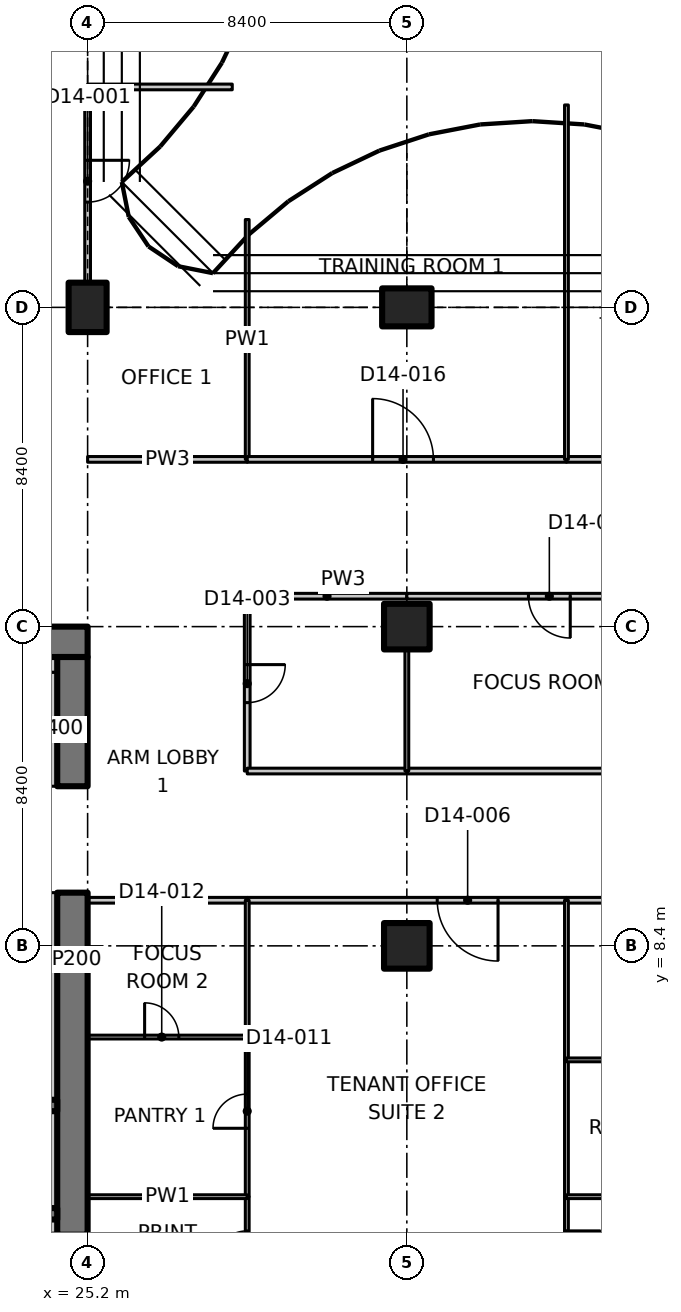
"""IFC4 building model, lengths in metres.
Left out: names, types, materials, properties, quantities, classifications, styles, units other than length and angle.
Written with IfcOpenShell. Run it as: python <this file> out.ifc"""

import sys

from ifc_helpers import new_model, si_unit, direction, frame, frame_2d, origin, origin_2d, place, context, subcontext, project, spatial, polyline, rectangle, outline, extrude, element, fill, save


model = new_model("IFC4")
c1 = context("Model", 3, precision=1e-05, world=origin(), true_north=direction((0.0, 1.0)))
c2 = subcontext(c1, "Body", "Model", "MODEL_VIEW")
j1 = project(units=[si_unit("LENGTHUNIT", "METRE"), si_unit("PLANEANGLEUNIT", "RADIAN")], contexts=[c1])
p1 = place(None, origin())
s1 = spatial("IfcSite", under=j1, at=p1, CompositionType="ELEMENT")
p2 = place(p1, origin())
s2 = spatial("IfcBuilding", under=s1, at=p2, CompositionType="ELEMENT")
p3 = place(p2, frame((0.0, 0.0, 106.1)))
s3 = spatial("IfcBuildingStorey", under=s2, at=p3, CompositionType="ELEMENT", Elevation=106.1)
p4 = place(p3, frame((25.2, 25.2, 0.0), z_axis=(0.0, 0.0, 1.0), x_axis=(1.0, 0.0, 0.0)))
e1 = element("IfcColumn", 1, at=p4, inside=s3, PredefinedType="COLUMN", context=c2, shape_type="SweptSolid", body=[
    extrude(rectangle(XDim=1.0, YDim=1.3, at=origin_2d()), origin(), (0.0, 0.0, 1.0), 3.35),
])
for number, where, z_axis, x_axis in (
    (2, (33.6, 8.4, 0.0), (0.0, 0.0, 1.0), (1.0, 0.0, 0.0)),
    (3, (33.6, 16.8, 0.0), (0.0, 0.0, 1.0), (1.0, 0.0, 0.0)),
):
    element("IfcColumn", number, at=place(p3, frame(where, z_axis=z_axis, x_axis=x_axis)), inside=s3, PredefinedType="COLUMN", context=c2, shape_type="SweptSolid", body=[
        extrude(rectangle(XDim=1.2, YDim=1.2, at=origin_2d()), origin(), (0.0, 0.0, 1.0), 3.35),
    ])
p5 = place(p3, frame((33.6, 25.2, 0.0), z_axis=(0.0, 0.0, 1.0), x_axis=(0.0, 1.0, 0.0)))
e4 = element("IfcColumn", 4, at=p5, inside=s3, PredefinedType="COLUMN", context=c2, shape_type="SweptSolid", body=[
    extrude(rectangle(XDim=1.0, YDim=1.3, at=origin_2d()), origin(), (0.0, 0.0, 1.0), 3.35),
])
p6 = place(p3, frame((23.8, 16.4, 0.0), z_axis=(0.0, 0.0, 1.0), x_axis=(1.0, 0.0, 0.0)))
e5 = element("IfcWall", 5, at=p6, inside=s3, PredefinedType="SHEAR", context=c2, shape_type="SweptSolid", body=[
    extrude(rectangle(XDim=1.4, YDim=0.8, at=frame_2d((0.7, 0.0))), origin(), (0.0, 0.0, 1.0), 3.35),
])
p7 = place(p3, frame((24.8, 0.8, 0.0), z_axis=(0.0, 0.0, 1.0), x_axis=(0.0, 1.0, 0.0)))
e6 = element("IfcWall", 6, at=p7, inside=s3, PredefinedType="SHEAR", context=c2, shape_type="SweptSolid", body=[
    extrude(rectangle(XDim=9.0, YDim=0.8, at=frame_2d((4.5, 0.0))), origin(), (0.0, 0.0, 1.0), 3.35),
])
p8 = place(p3, frame((24.8, 12.6, 0.0), z_axis=(0.0, 0.0, 1.0), x_axis=(0.0, 1.0, 0.0)))
e7 = element("IfcWall", 7, at=p8, inside=s3, PredefinedType="SHEAR", context=c2, shape_type="SweptSolid", body=[
    extrude(rectangle(XDim=3.4, YDim=0.8, at=frame_2d((1.7, 0.0))), origin(), (0.0, 0.0, 1.0), 3.35),
])
p9 = place(p3, frame((24.2, 12.6, 0.0), z_axis=(0.0, 0.0, 1.0), x_axis=(0.0, 1.0, 0.0)))
e8 = element("IfcWall", 8, at=p9, inside=s3, PredefinedType="PARTITIONING", context=c2, shape_type="SweptSolid", body=[
    extrude(rectangle(XDim=3.0, YDim=0.4, at=frame_2d((1.5, 0.0))), origin(), (0.0, 0.0, 1.0), 3.35),
])
p10 = place(p3, frame((23.8, 15.8, 0.0), z_axis=(0.0, 0.0, 1.0), x_axis=(1.0, 0.0, 0.0)))
e9 = element("IfcWall", 9, at=p10, inside=s3, PredefinedType="PARTITIONING", context=c2, shape_type="SweptSolid", body=[
    extrude(rectangle(XDim=0.6, YDim=0.4, at=frame_2d((0.3, 0.0))), origin(), (0.0, 0.0, 1.0), 3.35),
])
p11 = place(p3, frame((15.8, 1.35, 0.0), z_axis=(0.0, 0.0, 1.0), x_axis=(1.0, 0.0, 0.0)))
e10 = element("IfcWall", 10, at=p11, inside=s3, PredefinedType="SHEAR", context=c2, shape_type="SweptSolid", body=[
    extrude(rectangle(XDim=8.6, YDim=0.3, at=frame_2d((4.3, 0.0))), origin(), (0.0, 0.0, 1.0), 3.35),
])
p12 = place(p3, frame((15.8, 4.2, 0.0), z_axis=(0.0, 0.0, 1.0), x_axis=(1.0, 0.0, 0.0)))
e11 = element("IfcWall", 11, at=p12, inside=s3, PredefinedType="SHEAR", context=c2, shape_type="SweptSolid", body=[
    extrude(rectangle(XDim=8.6, YDim=0.3, at=frame_2d((4.3, 0.0))), origin(), (0.0, 0.0, 1.0), 3.35),
])
p13 = place(p12, frame((0.4, 0.0, 0.0)))
e12 = element("IfcOpeningElement", 12, at=p13, cuts=e11, PredefinedType="OPENING", context=c2, shape_type="SweptSolid", body=[
    extrude(rectangle(XDim=1.0, YDim=2.1, at=frame_2d((0.5, 1.05))), frame((0.0, 0.16, 0.0), z_axis=(0.0, -1.0, 0.0), x_axis=(1.0, 0.0, 0.0)), (0.0, 0.0, 1.0), 0.32),
])
p14 = place(p3, frame((13.35, 1.0, 0.0), z_axis=(0.0, 0.0, 1.0), x_axis=(1.0, 0.0, 0.0)))
e13 = element("IfcWall", 13, at=p14, inside=s3, PredefinedType="PARTITIONING", context=c2, shape_type="SweptSolid", body=[
    extrude(rectangle(XDim=11.05, YDim=0.4, at=frame_2d((5.525, 0.0))), origin(), (0.0, 0.0, 1.0), 3.35),
])
p15 = place(p3, frame((24.2, 1.5, 0.0), z_axis=(0.0, 0.0, 1.0), x_axis=(0.0, 1.0, 0.0)))
e14 = element("IfcWall", 14, at=p15, inside=s3, PredefinedType="PARTITIONING", context=c2, shape_type="SweptSolid", body=[
    extrude(rectangle(XDim=2.55, YDim=0.4, at=frame_2d((1.275, 0.0))), origin(), (0.0, 0.0, 1.0), 3.35),
])
p16 = place(p3, frame((24.2, 4.35, 0.0), z_axis=(0.0, 0.0, 1.0), x_axis=(0.0, 1.0, 0.0)))
e15 = element("IfcWall", 15, at=p16, inside=s3, PredefinedType="PARTITIONING", context=c2, shape_type="SweptSolid", body=[
    extrude(rectangle(XDim=5.45, YDim=0.4, at=frame_2d((2.725, 0.0))), origin(), (0.0, 0.0, 1.0), 3.35),
])
p17 = place(p3, frame((25.2, 21.2, 0.0), z_axis=(0.0, 0.0, 1.0), x_axis=(1.0, 0.0, 0.0)))
e16 = element("IfcWall", 16, at=p17, inside=s3, PredefinedType="PARTITIONING", context=c2, shape_type="SweptSolid", body=[
    extrude(rectangle(XDim=4.2, YDim=0.15, at=frame_2d((2.1, 0.0))), origin(), (0.0, 0.0, 1.0), 3.33),
])
p18 = place(p3, frame((29.4, 17.6, 0.0), z_axis=(0.0, 0.0, 1.0), x_axis=(0.0, -1.0, 0.0)))
e17 = element("IfcWall", 17, at=p18, inside=s3, PredefinedType="PARTITIONING", context=c2, shape_type="SweptSolid", body=[
    extrude(rectangle(XDim=4.6, YDim=0.15, at=frame_2d((2.3, 0.0))), origin(), (0.0, 0.0, 1.0), 3.33),
])
p19 = place(p18, frame((1.8, 0.0, 0.0)))
e18 = element("IfcOpeningElement", 18, at=p19, cuts=e17, PredefinedType="OPENING", context=c2, shape_type="SweptSolid", body=[
    extrude(rectangle(XDim=1.0, YDim=2.1, at=frame_2d((0.5, 1.05))), frame((0.0, 0.085, 0.0), z_axis=(0.0, -1.0, 0.0), x_axis=(1.0, 0.0, 0.0)), (0.0, 0.0, 1.0), 0.17),
])
p20 = place(p3, frame((29.4, 9.6, 0.0), z_axis=(0.0, 0.0, 1.0), x_axis=(-1.0, 0.0, 0.0)))
e19 = element("IfcWall", 19, at=p20, inside=s3, PredefinedType="PARTITIONING", context=c2, shape_type="SweptSolid", body=[
    extrude(rectangle(XDim=4.2, YDim=0.15, at=frame_2d((2.1, 0.0))), origin(), (0.0, 0.0, 1.0), 3.33),
])
p21 = place(p3, frame((29.4, 27.511, 0.0), z_axis=(0.0, 0.0, 1.0), x_axis=(0.0, -1.0, 0.0)))
e20 = element("IfcWall", 20, at=p21, inside=s3, PredefinedType="PARTITIONING", context=c2, shape_type="SweptSolid", body=[
    extrude(outline(polyline([(0.0, 0.0), (6.311, 0.0), (6.311, 3.33), (2.761, 3.33), (2.759, 2.98), (1.863, 2.98), (1.861, 3.33), (0.236, 3.33), (0.0, 3.33), (0.0, 0.0)])), frame((0.0, 0.05, 0.0), z_axis=(0.0, -1.0, 0.0), x_axis=(1.0, 0.0, 0.0)), (0.0, 0.0, 1.0), 0.1),
])
p22 = place(p3, frame((25.2, 31.0, 0.0), z_axis=(0.0, 0.0, 1.0), x_axis=(0.0, -1.0, 0.0)))
e21 = element("IfcWall", 21, at=p22, inside=s3, PredefinedType="PARTITIONING", context=c2, shape_type="SweptSolid", body=[
    extrude(outline(polyline([(0.0, 0.0), (5.13, 0.0), (5.13, 2.98), (0.0, 2.98), (0.0, 0.0)])), frame((0.0, 0.075, 0.0), z_axis=(0.0, -1.0, 0.0), x_axis=(1.0, 0.0, 0.0)), (0.0, 0.0, 1.0), 0.15),
])
p23 = place(p22, frame((1.93, 0.0, 0.0)))
e22 = element("IfcOpeningElement", 22, at=p23, cuts=e21, PredefinedType="OPENING", context=c2, shape_type="SweptSolid", body=[
    extrude(rectangle(XDim=1.1, YDim=2.1, at=frame_2d((0.55, 1.05))), frame((0.0, 0.085, 0.0), z_axis=(0.0, -1.0, 0.0), x_axis=(1.0, 0.0, 0.0)), (0.0, 0.0, 1.0), 0.17),
])
p24 = place(p3, frame((25.2, 31.0, 0.0), z_axis=(0.0, 0.0, 1.0), x_axis=(1.0, 0.0, 0.0)))
e23 = element("IfcWall", 23, at=p24, inside=s3, PredefinedType="PARTITIONING", context=c2, shape_type="SweptSolid", body=[
    extrude(rectangle(XDim=3.806, YDim=0.15, at=frame_2d((1.903, 0.0))), origin(), (0.0, 0.0, 1.0), 2.98),
])
p25 = place(p3, frame((29.4, 13.0, 0.0), z_axis=(0.0, 0.0, 1.0), x_axis=(1.0, 0.0, 0.0)))
e24 = element("IfcWall", 24, at=p25, inside=s3, PredefinedType="PARTITIONING", context=c2, shape_type="SweptSolid", body=[
    extrude(rectangle(XDim=4.2, YDim=0.15, at=frame_2d((2.1, 0.0))), origin(), (0.0, 0.0, 1.0), 3.33),
])
p26 = place(p3, frame((33.6, 13.0, 0.0), z_axis=(0.0, 0.0, 1.0), x_axis=(1.0, 0.0, 0.0)))
e25 = element("IfcWall", 25, at=p26, inside=s3, PredefinedType="PARTITIONING", context=c2, shape_type="SweptSolid", body=[
    extrude(rectangle(XDim=7.6, YDim=0.15, at=frame_2d((3.8, 0.0))), origin(), (0.0, 0.0, 1.0), 3.33),
])
p27 = place(p3, frame((37.8, 9.6, 0.0), z_axis=(0.0, 0.0, 1.0), x_axis=(-1.0, 0.0, 0.0)))
e26 = element("IfcWall", 26, at=p27, inside=s3, PredefinedType="PARTITIONING", context=c2, shape_type="SweptSolid", body=[
    extrude(rectangle(XDim=8.4, YDim=0.15, at=frame_2d((4.2, 0.0))), origin(), (0.0, 0.0, 1.0), 3.33),
])
p28 = place(p27, frame((1.8, 0.0, 0.0)))
e27 = element("IfcOpeningElement", 27, at=p28, cuts=e26, PredefinedType="OPENING", context=c2, shape_type="SweptSolid", body=[
    extrude(rectangle(XDim=1.6, YDim=2.1, at=frame_2d((0.8, 1.05))), frame((0.0, 0.085, 0.0), z_axis=(0.0, -1.0, 0.0), x_axis=(1.0, 0.0, 0.0)), (0.0, 0.0, 1.0), 0.17),
])
p29 = place(p3, frame((42.0, 9.6, 0.0), z_axis=(0.0, 0.0, 1.0), x_axis=(-1.0, 0.0, 0.0)))
e28 = element("IfcWall", 28, at=p29, inside=s3, PredefinedType="PARTITIONING", context=c2, shape_type="SweptSolid", body=[
    extrude(rectangle(XDim=4.2, YDim=0.15, at=frame_2d((2.1, 0.0))), origin(), (0.0, 0.0, 1.0), 3.33),
])
p30 = place(p3, frame((33.6, 17.6, 0.0), z_axis=(0.0, 0.0, 1.0), x_axis=(-1.0, 0.0, 0.0)))
e29 = element("IfcWall", 29, at=p30, inside=s3, PredefinedType="PARTITIONING", context=c2, shape_type="SweptSolid", body=[
    extrude(rectangle(XDim=4.2, YDim=0.15, at=frame_2d((2.1, 0.0))), origin(), (0.0, 0.0, 1.0), 3.33),
])
p31 = place(p3, frame((41.2, 17.6, 0.0), z_axis=(0.0, 0.0, 1.0), x_axis=(-1.0, 0.0, 0.0)))
e30 = element("IfcWall", 30, at=p31, inside=s3, PredefinedType="PARTITIONING", context=c2, shape_type="SweptSolid", body=[
    extrude(rectangle(XDim=7.6, YDim=0.15, at=frame_2d((3.8, 0.0))), origin(), (0.0, 0.0, 1.0), 3.33),
])
p32 = place(p31, frame((3.3, 0.0, 0.0)))
e31 = element("IfcOpeningElement", 31, at=p32, cuts=e30, PredefinedType="OPENING", context=c2, shape_type="SweptSolid", body=[
    extrude(rectangle(XDim=1.1, YDim=2.1, at=frame_2d((0.55, 1.05))), frame((0.0, 0.085, 0.0), z_axis=(0.0, -1.0, 0.0), x_axis=(1.0, 0.0, 0.0)), (0.0, 0.0, 1.0), 0.17),
])
p33 = place(p3, frame((29.4, 21.2, 0.0), z_axis=(0.0, 0.0, 1.0), x_axis=(1.0, 0.0, 0.0)))
e32 = element("IfcWall", 32, at=p33, inside=s3, PredefinedType="PARTITIONING", context=c2, shape_type="SweptSolid", body=[
    extrude(rectangle(XDim=8.4, YDim=0.15, at=frame_2d((4.2, 0.0))), origin(), (0.0, 0.0, 1.0), 3.33),
])
p34 = place(p33, frame((3.3, 0.0, 0.0)))
e33 = element("IfcOpeningElement", 33, at=p34, cuts=e32, PredefinedType="OPENING", context=c2, shape_type="SweptSolid", body=[
    extrude(rectangle(XDim=1.6, YDim=2.1, at=frame_2d((0.8, 1.05))), frame((0.0, 0.085, 0.0), z_axis=(0.0, -1.0, 0.0), x_axis=(1.0, 0.0, 0.0)), (0.0, 0.0, 1.0), 0.17),
])
p35 = place(p3, frame((37.8, 21.2, 0.0), z_axis=(0.0, 0.0, 1.0), x_axis=(1.0, 0.0, 0.0)))
e34 = element("IfcWall", 34, at=p35, inside=s3, PredefinedType="PARTITIONING", context=c2, shape_type="SweptSolid", body=[
    extrude(rectangle(XDim=13.2, YDim=0.15, at=frame_2d((6.6, 0.0))), origin(), (0.0, 0.0, 1.0), 3.33),
])
p36 = place(p35, frame((5.7, 0.0, 0.0)))
e35 = element("IfcOpeningElement", 35, at=p36, cuts=e34, PredefinedType="OPENING", context=c2, shape_type="SweptSolid", body=[
    extrude(rectangle(XDim=2.0, YDim=2.4, at=frame_2d((1.0, 1.2))), frame((0.0, 0.085, 0.0), z_axis=(0.0, -1.0, 0.0), x_axis=(1.0, 0.0, 0.0)), (0.0, 0.0, 1.0), 0.17),
])
p37 = place(p3, frame((33.6, 16.18, 0.0), z_axis=(0.0, 0.0, 1.0), x_axis=(0.0, -1.0, 0.0)))
e36 = element("IfcWall", 36, at=p37, inside=s3, PredefinedType="PARTITIONING", context=c2, shape_type="SweptSolid", body=[
    extrude(rectangle(XDim=3.18, YDim=0.1, at=frame_2d((1.59, 0.0))), origin(), (0.0, 0.0, 1.0), 3.33),
])
p38 = place(p3, frame((37.8, 1.8, 0.0), z_axis=(0.0, 0.0, 1.0), x_axis=(0.0, -1.0, 0.0)))
e37 = element("IfcWall", 37, at=p38, inside=s3, PredefinedType="PARTITIONING", context=c2, shape_type="SweptSolid", body=[
    extrude(rectangle(XDim=2.974, YDim=0.1, at=frame_2d((1.487, 0.0))), origin(), (0.0, 0.0, 1.0), 2.98),
])
p39 = place(p38, frame((0.9, 0.0, 0.0)))
e38 = element("IfcOpeningElement", 38, at=p39, cuts=e37, PredefinedType="OPENING", context=c2, shape_type="SweptSolid", body=[
    extrude(rectangle(XDim=0.9, YDim=2.1, at=frame_2d((0.45, 1.05))), frame((0.0, 0.06, 0.0), z_axis=(0.0, -1.0, 0.0), x_axis=(1.0, 0.0, 0.0)), (0.0, 0.0, 1.0), 0.12),
])
p40 = place(p3, frame((37.8, 5.4, 0.0), z_axis=(0.0, 0.0, 1.0), x_axis=(0.0, -1.0, 0.0)))
e39 = element("IfcWall", 39, at=p40, inside=s3, PredefinedType="PARTITIONING", context=c2, shape_type="SweptSolid", body=[
    extrude(rectangle(XDim=3.6, YDim=0.1, at=frame_2d((1.8, 0.0))), origin(), (0.0, 0.0, 1.0), 3.33),
])
p41 = place(p3, frame((37.8, 9.6, 0.0), z_axis=(0.0, 0.0, 1.0), x_axis=(0.0, -1.0, 0.0)))
e40 = element("IfcWall", 40, at=p41, inside=s3, PredefinedType="PARTITIONING", context=c2, shape_type="SweptSolid", body=[
    extrude(rectangle(XDim=4.2, YDim=0.1, at=frame_2d((2.1, 0.0))), origin(), (0.0, 0.0, 1.0), 3.33),
])
p42 = place(p3, frame((29.4, -1.174, 0.0), z_axis=(0.0, 0.0, 1.0), x_axis=(0.0, 1.0, 0.0)))
e41 = element("IfcWall", 41, at=p42, inside=s3, PredefinedType="PARTITIONING", context=c2, shape_type="SweptSolid", body=[
    extrude(rectangle(XDim=2.974, YDim=0.1, at=frame_2d((1.487, 0.0))), origin(), (0.0, 0.0, 1.0), 2.98),
])
p43 = place(p42, frame((1.174, 0.0, 0.0)))
e42 = element("IfcOpeningElement", 42, at=p43, cuts=e41, PredefinedType="OPENING", context=c2, shape_type="SweptSolid", body=[
    extrude(rectangle(XDim=0.9, YDim=2.1, at=frame_2d((0.45, 1.05))), frame((0.0, 0.06, 0.0), z_axis=(0.0, -1.0, 0.0), x_axis=(1.0, 0.0, 0.0)), (0.0, 0.0, 1.0), 0.12),
])
p44 = place(p3, frame((29.4, 1.8, 0.0), z_axis=(0.0, 0.0, 1.0), x_axis=(0.0, 1.0, 0.0)))
e43 = element("IfcWall", 43, at=p44, inside=s3, PredefinedType="PARTITIONING", context=c2, shape_type="SweptSolid", body=[
    extrude(rectangle(XDim=4.2, YDim=0.1, at=frame_2d((2.1, 0.0))), origin(), (0.0, 0.0, 1.0), 3.33),
])
p45 = place(p44, frame((1.8, 0.0, 0.0)))
e44 = element("IfcOpeningElement", 44, at=p45, cuts=e43, PredefinedType="OPENING", context=c2, shape_type="SweptSolid", body=[
    extrude(rectangle(XDim=0.9, YDim=2.1, at=frame_2d((0.45, 1.05))), frame((0.0, 0.06, 0.0), z_axis=(0.0, -1.0, 0.0), x_axis=(1.0, 0.0, 0.0)), (0.0, 0.0, 1.0), 0.12),
])
p46 = place(p3, frame((29.4, 6.0, 0.0), z_axis=(0.0, 0.0, 1.0), x_axis=(0.0, 1.0, 0.0)))
e45 = element("IfcWall", 45, at=p46, inside=s3, PredefinedType="PARTITIONING", context=c2, shape_type="SweptSolid", body=[
    extrude(rectangle(XDim=3.6, YDim=0.1, at=frame_2d((1.8, 0.0))), origin(), (0.0, 0.0, 1.0), 3.33),
])
p47 = place(p3, frame((37.8, 1.8, 0.0), z_axis=(0.0, 0.0, 1.0), x_axis=(1.0, 0.0, 0.0)))
e46 = element("IfcWall", 46, at=p47, inside=s3, PredefinedType="PARTITIONING", context=c2, shape_type="SweptSolid", body=[
    extrude(rectangle(XDim=4.2, YDim=0.1, at=frame_2d((2.1, 0.0))), origin(), (0.0, 0.0, 1.0), 3.33),
])
p48 = place(p47, frame((1.8, 0.0, 0.0)))
e47 = element("IfcOpeningElement", 47, at=p48, cuts=e46, PredefinedType="OPENING", context=c2, shape_type="SweptSolid", body=[
    extrude(rectangle(XDim=0.9, YDim=2.1, at=frame_2d((0.45, 1.05))), frame((0.0, 0.06, 0.0), z_axis=(0.0, -1.0, 0.0), x_axis=(1.0, 0.0, 0.0)), (0.0, 0.0, 1.0), 0.12),
])
p49 = place(p3, frame((37.8, 5.4, 0.0), z_axis=(0.0, 0.0, 1.0), x_axis=(1.0, 0.0, 0.0)))
e48 = element("IfcWall", 48, at=p49, inside=s3, PredefinedType="PARTITIONING", context=c2, shape_type="SweptSolid", body=[
    extrude(rectangle(XDim=4.2, YDim=0.1, at=frame_2d((2.1, 0.0))), origin(), (0.0, 0.0, 1.0), 3.33),
])
p50 = place(p49, frame((1.8, 0.0, 0.0)))
e49 = element("IfcOpeningElement", 49, at=p50, cuts=e48, PredefinedType="OPENING", context=c2, shape_type="SweptSolid", body=[
    extrude(rectangle(XDim=0.9, YDim=2.1, at=frame_2d((0.45, 1.05))), frame((0.0, 0.06, 0.0), z_axis=(0.0, -1.0, 0.0), x_axis=(1.0, 0.0, 0.0)), (0.0, 0.0, 1.0), 0.12),
])
p51 = place(p3, frame((25.2, 1.8, 0.0), z_axis=(0.0, 0.0, 1.0), x_axis=(1.0, 0.0, 0.0)))
e50 = element("IfcWall", 50, at=p51, inside=s3, PredefinedType="PARTITIONING", context=c2, shape_type="SweptSolid", body=[
    extrude(rectangle(XDim=4.2, YDim=0.1, at=frame_2d((2.1, 0.0))), origin(), (0.0, 0.0, 1.0), 3.33),
])
p52 = place(p3, frame((25.2, 6.0, 0.0), z_axis=(0.0, 0.0, 1.0), x_axis=(1.0, 0.0, 0.0)))
e51 = element("IfcWall", 51, at=p52, inside=s3, PredefinedType="PARTITIONING", context=c2, shape_type="SweptSolid", body=[
    extrude(rectangle(XDim=4.2, YDim=0.1, at=frame_2d((2.1, 0.0))), origin(), (0.0, 0.0, 1.0), 3.33),
])
p53 = place(p52, frame((1.5, 0.0, 0.0)))
e52 = element("IfcOpeningElement", 52, at=p53, cuts=e51, PredefinedType="OPENING", context=c2, shape_type="SweptSolid", body=[
    extrude(rectangle(XDim=0.9, YDim=2.1, at=frame_2d((0.45, 1.05))), frame((0.0, 0.06, 0.0), z_axis=(0.0, -1.0, 0.0), x_axis=(1.0, 0.0, 0.0)), (0.0, 0.0, 1.0), 0.12),
])
p54 = place(p3, frame((37.8, 30.526, 0.0), z_axis=(0.0, 0.0, 1.0), x_axis=(0.0, -1.0, 0.0)))
e53 = element("IfcWall", 53, at=p54, inside=s3, PredefinedType="PARTITIONING", context=c2, shape_type="SweptSolid", body=[
    extrude(outline(polyline([(0.0, 0.0), (9.326, 0.0), (9.326, 3.33), (5.776, 3.33), (5.774, 2.98), (4.878, 2.98), (4.876, 3.33), (0.283, 3.33), (0.0, 3.33), (0.0, 0.0)])), frame((0.0, 0.05, 0.0), z_axis=(0.0, -1.0, 0.0), x_axis=(1.0, 0.0, 0.0)), (0.0, 0.0, 1.0), 0.1),
])
p55 = place(p23, origin())
e54 = element("IfcDoor", 54, at=p55, inside=s3, OperationType="SINGLE_SWING_RIGHT", PredefinedType="DOOR", context=c2, shape_type="SweptSolid", body=[
    extrude(rectangle(XDim=1.1, YDim=2.1, at=frame_2d((0.55, 1.05))), frame((0.0, 0.025, 0.0), z_axis=(0.0, -1.0, 0.0), x_axis=(1.0, 0.0, 0.0)), (0.0, 0.0, 1.0), 0.05),
])
fill(e22, e54)
p56 = place(p19, origin())
e55 = element("IfcDoor", 55, at=p56, inside=s3, OperationType="SINGLE_SWING_LEFT", PredefinedType="DOOR", context=c2, shape_type="SweptSolid", body=[
    extrude(rectangle(XDim=1.0, YDim=2.1, at=frame_2d((0.5, 1.05))), frame((0.0, 0.025, 0.0), z_axis=(0.0, -1.0, 0.0), x_axis=(1.0, 0.0, 0.0)), (0.0, 0.0, 1.0), 0.05),
])
fill(e18, e55)
p57 = place(p32, origin())
e56 = element("IfcDoor", 56, at=p57, inside=s3, OperationType="SINGLE_SWING_LEFT", PredefinedType="DOOR", context=c2, shape_type="SweptSolid", body=[
    extrude(rectangle(XDim=1.1, YDim=2.1, at=frame_2d((0.55, 1.05))), frame((0.0, 0.025, 0.0), z_axis=(0.0, -1.0, 0.0), x_axis=(1.0, 0.0, 0.0)), (0.0, 0.0, 1.0), 0.05),
])
fill(e31, e56)
p58 = place(p28, origin())
e57 = element("IfcDoor", 57, at=p58, inside=s3, OperationType="DOUBLE_DOOR_SINGLE_SWING", PredefinedType="DOOR", context=c2, shape_type="SweptSolid", body=[
    extrude(rectangle(XDim=1.6, YDim=2.1, at=frame_2d((0.8, 1.05))), frame((0.0, 0.025, 0.0), z_axis=(0.0, -1.0, 0.0), x_axis=(1.0, 0.0, 0.0)), (0.0, 0.0, 1.0), 0.05),
])
fill(e27, e57)
p59 = place(p39, origin())
e58 = element("IfcDoor", 58, at=p59, inside=s3, OperationType="SINGLE_SWING_LEFT", PredefinedType="DOOR", context=c2, shape_type="SweptSolid", body=[
    extrude(rectangle(XDim=0.9, YDim=2.1, at=frame_2d((0.45, 1.05))), frame((0.0, 0.025, 0.0), z_axis=(0.0, -1.0, 0.0), x_axis=(1.0, 0.0, 0.0)), (0.0, 0.0, 1.0), 0.05),
])
fill(e38, e58)
p60 = place(p43, origin())
e59 = element("IfcDoor", 59, at=p60, inside=s3, OperationType="SINGLE_SWING_LEFT", PredefinedType="DOOR", context=c2, shape_type="SweptSolid", body=[
    extrude(rectangle(XDim=0.9, YDim=2.1, at=frame_2d((0.45, 1.05))), frame((0.0, 0.025, 0.0), z_axis=(0.0, -1.0, 0.0), x_axis=(1.0, 0.0, 0.0)), (0.0, 0.0, 1.0), 0.05),
])
fill(e42, e59)
p61 = place(p45, origin())
e60 = element("IfcDoor", 60, at=p61, inside=s3, OperationType="SINGLE_SWING_LEFT", PredefinedType="DOOR", context=c2, shape_type="SweptSolid", body=[
    extrude(rectangle(XDim=0.9, YDim=2.1, at=frame_2d((0.45, 1.05))), frame((0.0, 0.025, 0.0), z_axis=(0.0, -1.0, 0.0), x_axis=(1.0, 0.0, 0.0)), (0.0, 0.0, 1.0), 0.05),
])
fill(e44, e60)
p62 = place(p53, origin())
e61 = element("IfcDoor", 61, at=p62, inside=s3, OperationType="SINGLE_SWING_LEFT", PredefinedType="DOOR", context=c2, shape_type="SweptSolid", body=[
    extrude(rectangle(XDim=0.9, YDim=2.1, at=frame_2d((0.45, 1.05))), frame((0.0, 0.025, 0.0), z_axis=(0.0, -1.0, 0.0), x_axis=(1.0, 0.0, 0.0)), (0.0, 0.0, 1.0), 0.05),
])
fill(e52, e61)
p63 = place(p34, origin())
e62 = element("IfcDoor", 62, at=p63, inside=s3, OperationType="DOUBLE_DOOR_SINGLE_SWING", PredefinedType="DOOR", context=c2, shape_type="SweptSolid", body=[
    extrude(rectangle(XDim=1.6, YDim=2.1, at=frame_2d((0.8, 1.05))), frame((0.0, 0.025, 0.0), z_axis=(0.0, -1.0, 0.0), x_axis=(1.0, 0.0, 0.0)), (0.0, 0.0, 1.0), 0.05),
])
fill(e33, e62)
save(model, sys.argv[1])
